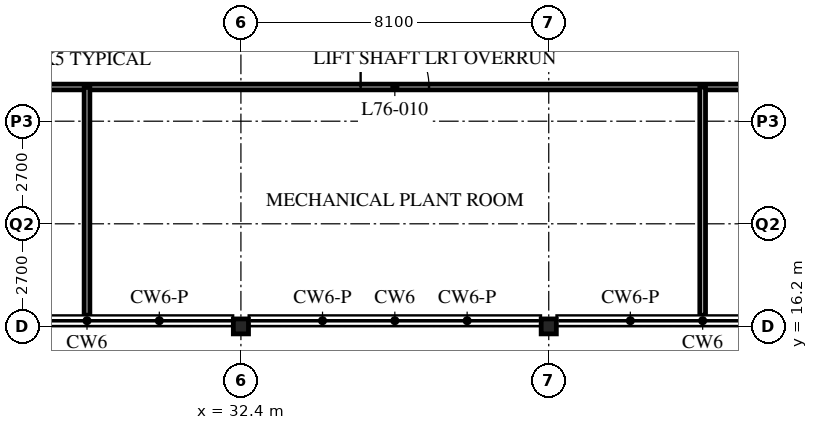
"""IFC4 building model, lengths in metres.
Left out: names, types, materials, properties, quantities, classifications, styles, units other than length and angle.
Written with IfcOpenShell. Run it as: python <this file> out.ifc"""

import sys

from ifc_helpers import new_model, si_unit, direction, frame, frame_2d, origin, origin_2d, place, context, subcontext, project, spatial, rectangle, i_section, extrude, element, fill, save


model = new_model("IFC4")
c1 = context("Model", 3, precision=1e-05, world=origin(), true_north=direction((0.0, 1.0)))
c2 = subcontext(c1, "Body", "Model", "MODEL_VIEW")
j1 = project(units=[si_unit("LENGTHUNIT", "METRE"), si_unit("PLANEANGLEUNIT", "RADIAN")], contexts=[c1])
p1 = place(None, origin())
s1 = spatial("IfcSite", under=j1, at=p1, CompositionType="ELEMENT")
p2 = place(p1, origin())
s2 = spatial("IfcBuilding", under=s1, at=p2, CompositionType="ELEMENT")
p3 = place(p2, frame((0.0, 0.0, 298.5)))
s3 = spatial("IfcBuildingStorey", under=s2, at=p3, CompositionType="ELEMENT", Elevation=298.5)
for number, where, z_axis, x_axis in (
    (1, (32.4, 16.2, 0.0), (0.0, 0.0, 1.0), (1.0, 0.0, 0.0)),
    (2, (40.5, 16.2, 0.0), (0.0, 0.0, 1.0), (1.0, 0.0, 0.0)),
):
    element("IfcColumn", number, at=place(p3, frame(where, z_axis=z_axis, x_axis=x_axis)), inside=s3, PredefinedType="COLUMN", context=c2, shape_type="SweptSolid", body=[
        extrude(i_section(OverallWidth=0.399, OverallDepth=0.394, WebThickness=0.023, FlangeThickness=0.037, FilletRadius=0.015, at=origin_2d()), origin(), (0.0, 0.0, 1.0), 5.4),
    ])
p4 = place(p3, frame((8.1, 22.5, 0.0), z_axis=(0.0, 0.0, 1.0), x_axis=(1.0, 0.0, 0.0)))
e3 = element("IfcWall", 3, at=p4, inside=s3, PredefinedType="PARTITIONING", context=c2, shape_type="SweptSolid", body=[
    extrude(rectangle(XDim=40.5, YDim=0.15, at=frame_2d((20.25, 0.0))), origin(), (0.0, 0.0, 1.0), 5.19),
])
p5 = place(p4, frame((11.25, 0.0, 0.0)))
e4 = element("IfcOpeningElement", 4, at=p5, cuts=e3, PredefinedType="OPENING", context=c2, shape_type="SweptSolid", body=[
    extrude(rectangle(XDim=1.8, YDim=2.4, at=frame_2d((0.9, 1.2))), frame((0.0, 0.085, 0.0), z_axis=(0.0, -1.0, 0.0), x_axis=(1.0, 0.0, 0.0)), (0.0, 0.0, 1.0), 0.17),
])
p6 = place(p4, frame((27.45, 0.0, 0.0)))
e5 = element("IfcOpeningElement", 5, at=p6, cuts=e3, PredefinedType="OPENING", context=c2, shape_type="SweptSolid", body=[
    extrude(rectangle(XDim=1.8, YDim=2.4, at=frame_2d((0.9, 1.2))), frame((0.0, 0.085, 0.0), z_axis=(0.0, -1.0, 0.0), x_axis=(1.0, 0.0, 0.0)), (0.0, 0.0, 1.0), 0.17),
])
p7 = place(p4, frame((1.525, 0.0, 0.0)))
e6 = element("IfcOpeningElement", 6, at=p7, cuts=e3, PredefinedType="OPENING", context=c2, shape_type="SweptSolid", body=[
    extrude(rectangle(XDim=1.0, YDim=2.1, at=frame_2d((0.5, 1.05))), frame((0.0, 0.085, 0.0), z_axis=(0.0, -1.0, 0.0), x_axis=(1.0, 0.0, 0.0)), (0.0, 0.0, 1.0), 0.17),
])
p8 = place(p4, frame((37.975, 0.0, 0.0)))
e7 = element("IfcOpeningElement", 7, at=p8, cuts=e3, PredefinedType="OPENING", context=c2, shape_type="SweptSolid", body=[
    extrude(rectangle(XDim=1.0, YDim=2.1, at=frame_2d((0.5, 1.05))), frame((0.0, 0.085, 0.0), z_axis=(0.0, -1.0, 0.0), x_axis=(1.0, 0.0, 0.0)), (0.0, 0.0, 1.0), 0.17),
])
for number, where, z_axis, x_axis in (
    (8, (28.35, 22.5, 0.0), (0.0, 0.0, 1.0), (0.0, -1.0, 0.0)),
    (9, (44.55, 22.5, 0.0), (0.0, 0.0, 1.0), (0.0, -1.0, 0.0)),
):
    element("IfcWall", number, at=place(p3, frame(where, z_axis=z_axis, x_axis=x_axis)), inside=s3, PredefinedType="PARTITIONING", context=c2, shape_type="SweptSolid", body=[
        extrude(rectangle(XDim=6.007, YDim=0.15, at=frame_2d((3.003, 0.0))), origin(), (0.0, 0.0, 1.0), 5.19),
    ])
p9 = place(p6, origin())
e10 = element("IfcDoor", 10, at=p9, inside=s3, OperationType="DOUBLE_DOOR_SINGLE_SWING", PredefinedType="DOOR", context=c2, shape_type="SweptSolid", body=[
    extrude(rectangle(XDim=1.8, YDim=2.4, at=frame_2d((0.9, 1.2))), frame((0.0, 0.025, 0.0), z_axis=(0.0, -1.0, 0.0), x_axis=(1.0, 0.0, 0.0)), (0.0, 0.0, 1.0), 0.05),
])
fill(e5, e10)
save(model, sys.argv[1])
